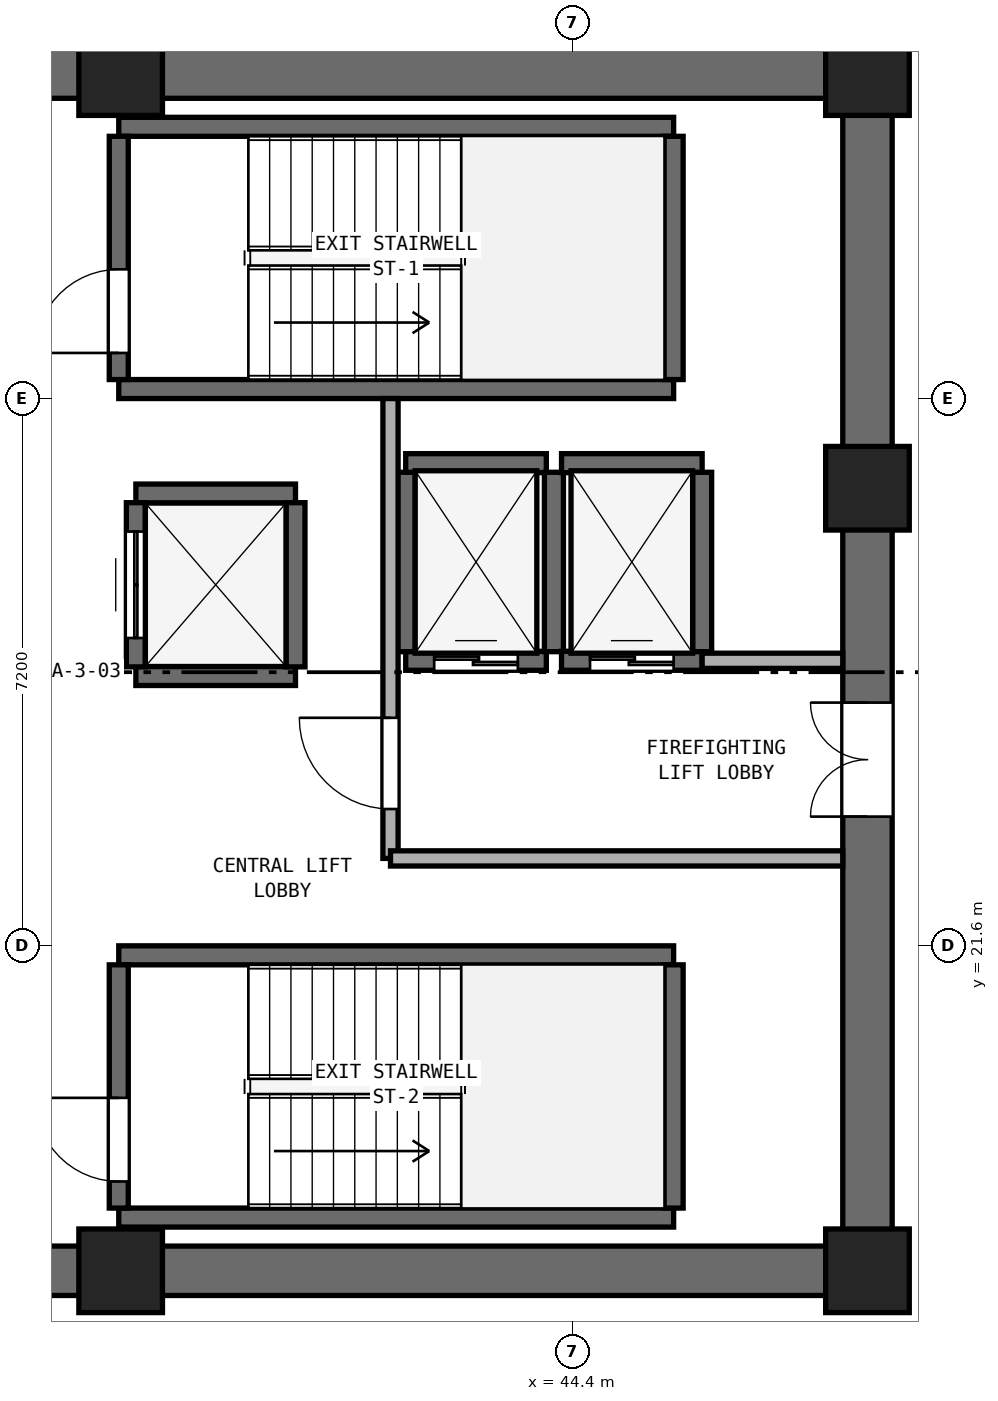
"""IFC4 building model, lengths in metres.
Left out: names, types, materials, properties, quantities, classifications, styles, units other than length and angle.
Written with IfcOpenShell. Run it as: python <this file> out.ifc"""

import sys

from ifc_helpers import new_model, si_unit, direction, frame, frame_2d, origin, origin_2d, place, context, subcontext, project, spatial, rectangle, extrude, element, fill, save


model = new_model("IFC4")
c1 = context("Model", 3, precision=1e-05, world=origin(), true_north=direction((0.0, 1.0)))
c2 = subcontext(c1, "Body", "Model", "MODEL_VIEW")
j1 = project(units=[si_unit("LENGTHUNIT", "METRE"), si_unit("PLANEANGLEUNIT", "RADIAN")], contexts=[c1])
p1 = place(None, origin())
s1 = spatial("IfcSite", under=j1, at=p1, CompositionType="ELEMENT")
p2 = place(p1, origin())
s2 = spatial("IfcBuilding", under=s1, at=p2, CompositionType="ELEMENT")
p3 = place(p2, frame((0.0, 0.0, 28.8)))
s3 = spatial("IfcBuildingStorey", under=s2, at=p3, CompositionType="ELEMENT", Elevation=28.8)
for number, where, z_axis, x_axis in (
    (1, (25.4, 17.325, 0.0), (0.0, 0.0, 1.0), (1.0, 0.0, 0.0)),
    (2, (25.4, 33.075, 0.0), (0.0, 0.0, 1.0), (1.0, 0.0, 0.0)),
):
    element("IfcWall", number, at=place(p3, frame(where, z_axis=z_axis, x_axis=x_axis)), inside=s3, PredefinedType="SHEAR", context=c2, shape_type="SweptSolid", body=[
        extrude(rectangle(XDim=23.2, YDim=0.65, at=frame_2d((11.6, 0.0))), origin(), (0.0, 0.0, 1.0), 3.525),
    ])
p4 = place(p3, frame((48.275, 17.65, 0.0), z_axis=(0.0, 0.0, 1.0), x_axis=(0.0, 1.0, 0.0)))
e3 = element("IfcWall", 3, at=p4, inside=s3, PredefinedType="SHEAR", context=c2, shape_type="SweptSolid", body=[
    extrude(rectangle(XDim=15.1, YDim=0.65, at=frame_2d((7.55, 0.0))), origin(), (0.0, 0.0, 1.0), 3.525),
])
p5 = place(p4, frame((5.65, 0.0, 0.0)))
e4 = element("IfcOpeningElement", 4, at=p5, cuts=e3, PredefinedType="OPENING", context=c2, shape_type="SweptSolid", body=[
    extrude(rectangle(XDim=1.5, YDim=2.15, at=frame_2d((0.75, 1.075))), frame((0.0, 0.335, 0.0), z_axis=(0.0, -1.0, 0.0), x_axis=(1.0, 0.0, 0.0)), (0.0, 0.0, 1.0), 0.67),
])
for number, where, z_axis, x_axis in (
    (5, (38.45, 17.325, 0.0), (0.0, 0.0, 1.0), (1.0, 0.0, 0.0)),
    (6, (48.275, 17.325, 0.0), (0.0, 0.0, 1.0), (1.0, 0.0, 0.0)),
    (7, (48.275, 27.62, 0.0), (0.0, 0.0, 1.0), (1.0, 0.0, 0.0)),
    (8, (48.275, 33.075, 0.0), (0.0, 0.0, 1.0), (1.0, 0.0, 0.0)),
    (9, (38.45, 33.075, 0.0), (0.0, 0.0, 1.0), (1.0, 0.0, 0.0)),
):
    element("IfcColumn", number, at=place(p3, frame(where, z_axis=z_axis, x_axis=x_axis)), inside=s3, PredefinedType="PILASTER", context=c2, shape_type="SweptSolid", body=[
        extrude(rectangle(XDim=1.1, YDim=1.1, at=origin_2d()), origin(), (0.0, 0.0, 1.0), 3.8),
    ])
for number, where, z_axis, x_axis in (
    (10, (38.425, 28.925, 0.0), (0.0, 0.0, 1.0), (1.0, 0.0, 0.0)),
    (11, (38.425, 32.375, 0.0), (0.0, 0.0, 1.0), (1.0, 0.0, 0.0)),
):
    element("IfcWall", number, at=place(p3, frame(where, z_axis=z_axis, x_axis=x_axis)), inside=s3, PredefinedType="SHEAR", context=c2, shape_type="SweptSolid", body=[
        extrude(rectangle(XDim=7.3, YDim=0.25, at=frame_2d((3.65, 0.0))), origin(), (0.0, 0.0, 1.0), 3.525),
    ])
p6 = place(p3, frame((38.425, 29.05, 0.0), z_axis=(0.0, 0.0, 1.0), x_axis=(0.0, 1.0, 0.0)))
e12 = element("IfcWall", 12, at=p6, inside=s3, PredefinedType="SHEAR", context=c2, shape_type="SweptSolid", body=[
    extrude(rectangle(XDim=3.2, YDim=0.25, at=frame_2d((1.6, 0.0))), origin(), (0.0, 0.0, 1.0), 3.525),
])
p7 = place(p6, frame((0.35, 0.0, 0.0)))
e13 = element("IfcOpeningElement", 13, at=p7, cuts=e12, PredefinedType="OPENING", context=c2, shape_type="SweptSolid", body=[
    extrude(rectangle(XDim=1.1, YDim=2.15, at=frame_2d((0.55, 1.075))), frame((0.0, 0.135, 0.0), z_axis=(0.0, -1.0, 0.0), x_axis=(1.0, 0.0, 0.0)), (0.0, 0.0, 1.0), 0.27),
])
p8 = place(p3, frame((45.725, 29.05, 0.0), z_axis=(0.0, 0.0, 1.0), x_axis=(0.0, 1.0, 0.0)))
e14 = element("IfcWall", 14, at=p8, inside=s3, PredefinedType="SHEAR", context=c2, shape_type="SweptSolid", body=[
    extrude(rectangle(XDim=3.2, YDim=0.25, at=frame_2d((1.6, 0.0))), origin(), (0.0, 0.0, 1.0), 3.525),
])
for number, where, z_axis, x_axis in (
    (15, (38.425, 18.025, 0.0), (0.0, 0.0, 1.0), (1.0, 0.0, 0.0)),
    (16, (38.425, 21.475, 0.0), (0.0, 0.0, 1.0), (1.0, 0.0, 0.0)),
):
    element("IfcWall", number, at=place(p3, frame(where, z_axis=z_axis, x_axis=x_axis)), inside=s3, PredefinedType="SHEAR", context=c2, shape_type="SweptSolid", body=[
        extrude(rectangle(XDim=7.3, YDim=0.25, at=frame_2d((3.65, 0.0))), origin(), (0.0, 0.0, 1.0), 3.525),
    ])
p9 = place(p3, frame((38.425, 18.15, 0.0), z_axis=(0.0, 0.0, 1.0), x_axis=(0.0, 1.0, 0.0)))
e17 = element("IfcWall", 17, at=p9, inside=s3, PredefinedType="SHEAR", context=c2, shape_type="SweptSolid", body=[
    extrude(rectangle(XDim=3.2, YDim=0.25, at=frame_2d((1.6, 0.0))), origin(), (0.0, 0.0, 1.0), 3.525),
])
p10 = place(p9, frame((0.35, 0.0, 0.0)))
e18 = element("IfcOpeningElement", 18, at=p10, cuts=e17, PredefinedType="OPENING", context=c2, shape_type="SweptSolid", body=[
    extrude(rectangle(XDim=1.1, YDim=2.15, at=frame_2d((0.55, 1.075))), frame((0.0, 0.135, 0.0), z_axis=(0.0, -1.0, 0.0), x_axis=(1.0, 0.0, 0.0)), (0.0, 0.0, 1.0), 0.27),
])
p11 = place(p3, frame((45.725, 18.15, 0.0), z_axis=(0.0, 0.0, 1.0), x_axis=(0.0, 1.0, 0.0)))
e19 = element("IfcWall", 19, at=p11, inside=s3, PredefinedType="SHEAR", context=c2, shape_type="SweptSolid", body=[
    extrude(rectangle(XDim=3.2, YDim=0.25, at=frame_2d((1.6, 0.0))), origin(), (0.0, 0.0, 1.0), 3.525),
])
p12 = place(p3, frame((42.2, 25.35, 0.0), z_axis=(0.0, 0.0, 1.0), x_axis=(1.0, 0.0, 0.0)))
e20 = element("IfcWall", 20, at=p12, inside=s3, PredefinedType="SHEAR", context=c2, shape_type="SweptSolid", body=[
    extrude(rectangle(XDim=1.85, YDim=0.25, at=frame_2d((0.925, 0.0))), origin(), (0.0, 0.0, 1.0), 3.525),
])
p13 = place(p12, frame((0.375, 0.0, 0.0)))
e21 = element("IfcOpeningElement", 21, at=p13, cuts=e20, PredefinedType="OPENING", context=c2, shape_type="SweptSolid", body=[
    extrude(rectangle(XDim=1.1, YDim=2.15, at=frame_2d((0.55, 1.075))), frame((0.0, 0.135, 0.0), z_axis=(0.0, -1.0, 0.0), x_axis=(1.0, 0.0, 0.0)), (0.0, 0.0, 1.0), 0.27),
])
p14 = place(p3, frame((42.2, 27.95, 0.0), z_axis=(0.0, 0.0, 1.0), x_axis=(1.0, 0.0, 0.0)))
e22 = element("IfcWall", 22, at=p14, inside=s3, PredefinedType="SHEAR", context=c2, shape_type="SweptSolid", body=[
    extrude(rectangle(XDim=1.85, YDim=0.25, at=frame_2d((0.925, 0.0))), origin(), (0.0, 0.0, 1.0), 3.525),
])
for number, where, z_axis, x_axis in (
    (23, (42.2, 25.47, 0.0), (0.0, 0.0, 1.0), (0.0, 1.0, 0.0)),
    (24, (44.15, 25.47, 0.0), (0.0, 0.0, 1.0), (0.0, 1.0, 0.0)),
):
    element("IfcWall", number, at=place(p3, frame(where, z_axis=z_axis, x_axis=x_axis)), inside=s3, PredefinedType="SHEAR", context=c2, shape_type="SweptSolid", body=[
        extrude(rectangle(XDim=2.36, YDim=0.25, at=frame_2d((1.18, 0.0))), origin(), (0.0, 0.0, 1.0), 3.525),
    ])
p15 = place(p3, frame((44.25, 25.35, 0.0), z_axis=(0.0, 0.0, 1.0), x_axis=(1.0, 0.0, 0.0)))
e25 = element("IfcWall", 25, at=p15, inside=s3, PredefinedType="SHEAR", context=c2, shape_type="SweptSolid", body=[
    extrude(rectangle(XDim=1.85, YDim=0.25, at=frame_2d((0.925, 0.0))), origin(), (0.0, 0.0, 1.0), 3.525),
])
p16 = place(p15, frame((0.375, 0.0, 0.0)))
e26 = element("IfcOpeningElement", 26, at=p16, cuts=e25, PredefinedType="OPENING", context=c2, shape_type="SweptSolid", body=[
    extrude(rectangle(XDim=1.1, YDim=2.15, at=frame_2d((0.55, 1.075))), frame((0.0, 0.135, 0.0), z_axis=(0.0, -1.0, 0.0), x_axis=(1.0, 0.0, 0.0)), (0.0, 0.0, 1.0), 0.27),
])
p17 = place(p3, frame((44.25, 27.95, 0.0), z_axis=(0.0, 0.0, 1.0), x_axis=(1.0, 0.0, 0.0)))
e27 = element("IfcWall", 27, at=p17, inside=s3, PredefinedType="SHEAR", context=c2, shape_type="SweptSolid", body=[
    extrude(rectangle(XDim=1.85, YDim=0.25, at=frame_2d((0.925, 0.0))), origin(), (0.0, 0.0, 1.0), 3.525),
])
p18 = place(p3, frame((46.1, 25.47, 0.0), z_axis=(0.0, 0.0, 1.0), x_axis=(0.0, 1.0, 0.0)))
e28 = element("IfcWall", 28, at=p18, inside=s3, PredefinedType="SHEAR", context=c2, shape_type="SweptSolid", body=[
    extrude(rectangle(XDim=2.36, YDim=0.25, at=frame_2d((1.18, 0.0))), origin(), (0.0, 0.0, 1.0), 3.525),
])
for number, where, z_axis, x_axis in (
    (29, (38.65, 25.15, 0.0), (0.0, 0.0, 1.0), (1.0, 0.0, 0.0)),
    (30, (38.65, 27.55, 0.0), (0.0, 0.0, 1.0), (1.0, 0.0, 0.0)),
):
    element("IfcWall", number, at=place(p3, frame(where, z_axis=z_axis, x_axis=x_axis)), inside=s3, PredefinedType="SHEAR", context=c2, shape_type="SweptSolid", body=[
        extrude(rectangle(XDim=2.1, YDim=0.25, at=frame_2d((1.05, 0.0))), origin(), (0.0, 0.0, 1.0), 3.525),
    ])
p19 = place(p3, frame((38.65, 25.27, 0.0), z_axis=(0.0, 0.0, 1.0), x_axis=(0.0, 1.0, 0.0)))
e31 = element("IfcWall", 31, at=p19, inside=s3, PredefinedType="SHEAR", context=c2, shape_type="SweptSolid", body=[
    extrude(rectangle(XDim=2.16, YDim=0.25, at=frame_2d((1.08, 0.0))), origin(), (0.0, 0.0, 1.0), 3.525),
])
p20 = place(p19, frame((0.38, 0.0, 0.0)))
e32 = element("IfcOpeningElement", 32, at=p20, cuts=e31, PredefinedType="OPENING", context=c2, shape_type="SweptSolid", body=[
    extrude(rectangle(XDim=1.4, YDim=2.2, at=frame_2d((0.7, 1.1))), frame((0.0, 0.135, 0.0), z_axis=(0.0, -1.0, 0.0), x_axis=(1.0, 0.0, 0.0)), (0.0, 0.0, 1.0), 0.27),
])
p21 = place(p3, frame((40.75, 25.27, 0.0), z_axis=(0.0, 0.0, 1.0), x_axis=(0.0, 1.0, 0.0)))
e33 = element("IfcWall", 33, at=p21, inside=s3, PredefinedType="SHEAR", context=c2, shape_type="SweptSolid", body=[
    extrude(rectangle(XDim=2.16, YDim=0.25, at=frame_2d((1.08, 0.0))), origin(), (0.0, 0.0, 1.0), 3.525),
])
p22 = place(p3, frame((42.0, 22.75, 0.0), z_axis=(0.0, 0.0, 1.0), x_axis=(0.0, 1.0, 0.0)))
e34 = element("IfcWall", 34, at=p22, inside=s3, PredefinedType="SOLIDWALL", context=c2, shape_type="SweptSolid", body=[
    extrude(rectangle(XDim=6.05, YDim=0.2, at=frame_2d((3.025, 0.0))), origin(), (0.0, 0.0, 1.0), 3.525),
])
p23 = place(p22, frame((0.65, 0.0, 0.0)))
e35 = element("IfcOpeningElement", 35, at=p23, cuts=e34, PredefinedType="OPENING", context=c2, shape_type="SweptSolid", body=[
    extrude(rectangle(XDim=1.2, YDim=2.15, at=frame_2d((0.6, 1.075))), frame((0.0, 0.11, 0.0), z_axis=(0.0, -1.0, 0.0), x_axis=(1.0, 0.0, 0.0)), (0.0, 0.0, 1.0), 0.22),
])
p24 = place(p3, frame((42.0, 22.75, 0.0), z_axis=(0.0, 0.0, 1.0), x_axis=(1.0, 0.0, 0.0)))
e36 = element("IfcWall", 36, at=p24, inside=s3, PredefinedType="SOLIDWALL", context=c2, shape_type="SweptSolid", body=[
    extrude(rectangle(XDim=5.95, YDim=0.2, at=frame_2d((2.975, 0.0))), origin(), (0.0, 0.0, 1.0), 3.525),
])
p25 = place(p3, frame((46.1, 25.35, 0.0), z_axis=(0.0, 0.0, 1.0), x_axis=(1.0, 0.0, 0.0)))
e37 = element("IfcWall", 37, at=p25, inside=s3, PredefinedType="SOLIDWALL", context=c2, shape_type="SweptSolid", body=[
    extrude(rectangle(XDim=1.85, YDim=0.2, at=frame_2d((0.925, 0.0))), origin(), (0.0, 0.0, 1.0), 3.525),
])
p26 = place(p7, origin())
e38 = element("IfcDoor", 38, at=p26, inside=s3, OperationType="SINGLE_SWING_LEFT", PredefinedType="DOOR", context=c2, shape_type="SweptSolid", body=[
    extrude(rectangle(XDim=1.1, YDim=2.15, at=frame_2d((0.55, 1.075))), frame((0.0, 0.025, 0.0), z_axis=(0.0, -1.0, 0.0), x_axis=(1.0, 0.0, 0.0)), (0.0, 0.0, 1.0), 0.05),
])
fill(e13, e38)
p27 = place(p10, origin())
e39 = element("IfcDoor", 39, at=p27, inside=s3, OperationType="SINGLE_SWING_RIGHT", PredefinedType="DOOR", context=c2, shape_type="SweptSolid", body=[
    extrude(rectangle(XDim=1.1, YDim=2.15, at=frame_2d((0.55, 1.075))), frame((0.0, 0.025, 0.0), z_axis=(0.0, -1.0, 0.0), x_axis=(1.0, 0.0, 0.0)), (0.0, 0.0, 1.0), 0.05),
])
fill(e18, e39)
p28 = place(p13, origin())
e40 = element("IfcDoor", 40, at=p28, inside=s3, OperationType="DOUBLE_DOOR_SLIDING", PredefinedType="DOOR", context=c2, shape_type="SweptSolid", body=[
    extrude(rectangle(XDim=1.1, YDim=2.15, at=frame_2d((0.55, 1.075))), frame((0.0, 0.025, 0.0), z_axis=(0.0, -1.0, 0.0), x_axis=(1.0, 0.0, 0.0)), (0.0, 0.0, 1.0), 0.05),
])
fill(e21, e40)
p29 = place(p16, origin())
e41 = element("IfcDoor", 41, at=p29, inside=s3, OperationType="DOUBLE_DOOR_SLIDING", PredefinedType="DOOR", context=c2, shape_type="SweptSolid", body=[
    extrude(rectangle(XDim=1.1, YDim=2.15, at=frame_2d((0.55, 1.075))), frame((0.0, 0.025, 0.0), z_axis=(0.0, -1.0, 0.0), x_axis=(1.0, 0.0, 0.0)), (0.0, 0.0, 1.0), 0.05),
])
fill(e26, e41)
p30 = place(p20, origin())
e42 = element("IfcDoor", 42, at=p30, inside=s3, OperationType="DOUBLE_DOOR_SLIDING", PredefinedType="DOOR", context=c2, shape_type="SweptSolid", body=[
    extrude(rectangle(XDim=1.4, YDim=2.2, at=frame_2d((0.7, 1.1))), frame((0.0, 0.025, 0.0), z_axis=(0.0, -1.0, 0.0), x_axis=(1.0, 0.0, 0.0)), (0.0, 0.0, 1.0), 0.05),
])
fill(e32, e42)
p31 = place(p23, origin())
e43 = element("IfcDoor", 43, at=p31, inside=s3, OperationType="SINGLE_SWING_RIGHT", PredefinedType="DOOR", context=c2, shape_type="SweptSolid", body=[
    extrude(rectangle(XDim=1.2, YDim=2.15, at=frame_2d((0.6, 1.075))), frame((0.0, 0.025, 0.0), z_axis=(0.0, -1.0, 0.0), x_axis=(1.0, 0.0, 0.0)), (0.0, 0.0, 1.0), 0.05),
])
fill(e35, e43)
p32 = place(p5, origin())
e44 = element("IfcDoor", 44, at=p32, inside=s3, OperationType="DOUBLE_DOOR_SINGLE_SWING", PredefinedType="DOOR", context=c2, shape_type="SweptSolid", body=[
    extrude(rectangle(XDim=1.5, YDim=2.15, at=frame_2d((0.75, 1.075))), frame((0.0, 0.025, 0.0), z_axis=(0.0, -1.0, 0.0), x_axis=(1.0, 0.0, 0.0)), (0.0, 0.0, 1.0), 0.05),
])
fill(e4, e44)
save(model, sys.argv[1])
